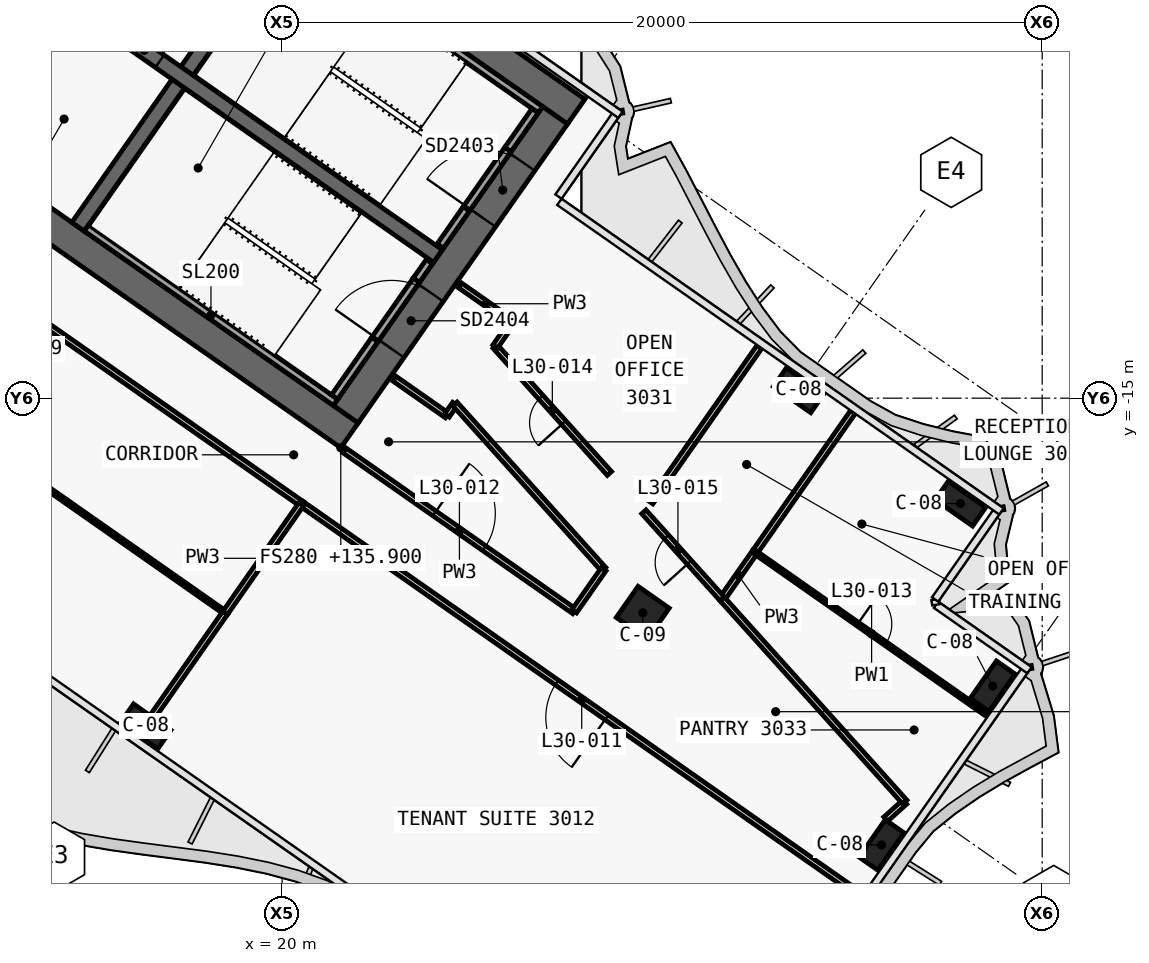
"""IFC4 building model, lengths in metres.
Left out: names, types, materials, properties, quantities, classifications, styles, units other than length and angle.
Written with IfcOpenShell. Run it as: python <this file> out.ifc"""

import sys

from ifc_helpers import new_model, si_unit, direction, frame, frame_2d, origin, origin_2d, place, context, subcontext, project, spatial, polyline, rectangle, outline, extrude, element, fill, save


model = new_model("IFC4")
c1 = context("Model", 3, precision=1e-05, world=origin(), true_north=direction((0.0, 1.0)))
c2 = subcontext(c1, "Body", "Model", "MODEL_VIEW")
j1 = project(units=[si_unit("LENGTHUNIT", "METRE"), si_unit("PLANEANGLEUNIT", "RADIAN")], contexts=[c1])
p1 = place(None, origin())
s1 = spatial("IfcSite", under=j1, at=p1, CompositionType="ELEMENT")
p2 = place(p1, origin())
s2 = spatial("IfcBuilding", under=s1, at=p2, CompositionType="ELEMENT")
p3 = place(p2, frame((0.0, 0.0, 135.9)))
s3 = spatial("IfcBuildingStorey", under=s2, at=p3, CompositionType="ELEMENT", Elevation=135.9)
p4 = place(p3, frame((-0.029, 11.984, 0.0), z_axis=(0.0, 0.0, 1.0), x_axis=(0.819151382952, -0.573577380837, 0.0)))
e1 = element("IfcWall", 1, at=p4, inside=s3, PredefinedType="SHEAR", context=c2, shape_type="SweptSolid", body=[
    extrude(outline(polyline([(33.898, 0.4), (-0.0, 0.4), (0.56, -0.4), (33.898, -0.4), (33.898, 0.4)])), origin(), (0.0, 0.0, 1.0), 3.9),
])
p5 = place(p3, frame((-0.029, -0.712, 0.0), z_axis=(0.0, 0.0, 1.0), x_axis=(0.819151758019, -0.573576845187, 0.0)))
e2 = element("IfcWall", 2, at=p5, inside=s3, PredefinedType="SHEAR", context=c2, shape_type="SweptSolid", body=[
    extrude(outline(polyline([(26.616, 0.4), (-0.0, 0.4), (0.56, -0.4), (26.616, -0.4), (26.616, 0.4)])), origin(), (0.0, 0.0, 1.0), 3.9),
])
p6 = place(p5, frame((1.166, 0.0, 0.0)))
e3 = element("IfcOpeningElement", 3, at=p6, cuts=e2, PredefinedType="OPENING", context=c2, shape_type="SweptSolid", body=[
    extrude(rectangle(XDim=1.5, YDim=2.1, at=frame_2d((0.75, 1.05))), frame((0.0, 0.41, 0.0), z_axis=(0.0, -1.0, 0.0), x_axis=(1.0, 0.0, 0.0)), (0.0, 0.0, 1.0), 0.82),
])
p7 = place(p5, frame((12.366, 0.0, 0.0)))
e4 = element("IfcOpeningElement", 4, at=p7, cuts=e2, PredefinedType="OPENING", context=c2, shape_type="SweptSolid", body=[
    extrude(rectangle(XDim=1.5, YDim=2.1, at=frame_2d((0.75, 1.05))), frame((0.0, 0.41, 0.0), z_axis=(0.0, -1.0, 0.0), x_axis=(1.0, 0.0, 0.0)), (0.0, 0.0, 1.0), 0.82),
])
p8 = place(p3, frame((21.675, -15.421, 0.0), z_axis=(0.0, 0.0, 1.0), x_axis=(0.573581815061, 0.819148278049, 0.0)))
e5 = element("IfcWall", 5, at=p8, inside=s3, PredefinedType="SHEAR", context=c2, shape_type="SweptSolid", body=[
    extrude(outline(polyline([(9.6, 0.4), (0.0, 0.4), (0.0, -0.4), (9.6, -0.4), (9.6, 0.4)])), origin(), (0.0, 0.0, 1.0), 3.9),
])
p9 = place(p8, frame((6.3, 0.0, 0.0)))
e6 = element("IfcOpeningElement", 6, at=p9, cuts=e5, PredefinedType="OPENING", context=c2, shape_type="SweptSolid", body=[
    extrude(rectangle(XDim=1.8, YDim=2.1, at=frame_2d((0.9, 1.05))), frame((0.0, 0.41, 0.0), z_axis=(0.0, -1.0, 0.0), x_axis=(1.0, 0.0, 0.0)), (0.0, 0.0, 1.0), 0.82),
])
p10 = place(p8, frame((2.1, 0.0, 0.0)))
e7 = element("IfcOpeningElement", 7, at=p10, cuts=e5, PredefinedType="OPENING", context=c2, shape_type="SweptSolid", body=[
    extrude(rectangle(XDim=1.8, YDim=2.1, at=frame_2d((0.9, 1.05))), frame((0.0, 0.41, 0.0), z_axis=(0.0, -1.0, 0.0), x_axis=(1.0, 0.0, 0.0)), (0.0, 0.0, 1.0), 0.82),
])
p11 = place(p3, frame((14.63, -10.488, 0.0), z_axis=(0.0, 0.0, 1.0), x_axis=(0.573611936273, 0.819127185829, 0.0)))
e8 = element("IfcWall", 8, at=p11, inside=s3, PredefinedType="SHEAR", context=c2, shape_type="SweptSolid", body=[
    extrude(outline(polyline([(0.0, 0.2), (0.0, -0.2), (4.6, -0.2), (4.6, 0.2), (0.0, 0.2)])), origin(), (0.0, 0.0, 1.0), 3.9),
])
p12 = place(p3, frame((17.498, -6.392, 0.0), z_axis=(0.0, 0.0, 1.0), x_axis=(0.573611936273, 0.819127185829, 0.0)))
e9 = element("IfcWall", 9, at=p12, inside=s3, PredefinedType="SHEAR", context=c2, shape_type="SweptSolid", body=[
    extrude(outline(polyline([(4.6, -0.2), (4.6, 0.2), (0.0, 0.2), (0.0, -0.2), (4.6, -0.2)])), origin(), (0.0, 0.0, 1.0), 3.9),
])
p13 = place(p3, frame((2.638, 3.768, 0.0), z_axis=(0.0, 0.0, 1.0), x_axis=(0.81915267502, -0.573575535572, 0.0)))
e10 = element("IfcWall", 10, at=p13, inside=s3, PredefinedType="SHEAR", context=c2, shape_type="SweptSolid", body=[
    extrude(outline(polyline([(0.0, 0.2), (0.0, -0.2), (26.2, -0.2), (26.2, 0.2), (0.0, 0.2)])), origin(), (0.0, 0.0, 1.0), 3.9),
])
p14 = place(p13, frame((9.637, 0.0, 0.0)))
e11 = element("IfcOpeningElement", 11, at=p14, cuts=e10, PredefinedType="OPENING", context=c2, shape_type="SweptSolid", body=[
    extrude(rectangle(XDim=1.2, YDim=2.1, at=frame_2d((0.6, 1.05))), frame((0.0, 0.21, 0.0), z_axis=(0.0, -1.0, 0.0), x_axis=(1.0, 0.0, 0.0)), (0.0, 0.0, 1.0), 0.42),
])
p15 = place(p13, frame((11.812, 0.0, 0.0)))
e12 = element("IfcOpeningElement", 12, at=p15, cuts=e10, PredefinedType="OPENING", context=c2, shape_type="SweptSolid", body=[
    extrude(rectangle(XDim=1.2, YDim=2.1, at=frame_2d((0.6, 1.05))), frame((0.0, 0.21, 0.0), z_axis=(0.0, -1.0, 0.0), x_axis=(1.0, 0.0, 0.0)), (0.0, 0.0, 1.0), 0.42),
])
p16 = place(p13, frame((13.988, 0.0, 0.0)))
e13 = element("IfcOpeningElement", 13, at=p16, cuts=e10, PredefinedType="OPENING", context=c2, shape_type="SweptSolid", body=[
    extrude(rectangle(XDim=1.2, YDim=2.1, at=frame_2d((0.6, 1.05))), frame((0.0, 0.21, 0.0), z_axis=(0.0, -1.0, 0.0), x_axis=(1.0, 0.0, 0.0)), (0.0, 0.0, 1.0), 0.42),
])
p17 = place(p13, frame((16.262, 0.0, 0.0)))
e14 = element("IfcOpeningElement", 14, at=p17, cuts=e10, PredefinedType="OPENING", context=c2, shape_type="SweptSolid", body=[
    extrude(rectangle(XDim=1.0, YDim=2.1, at=frame_2d((0.5, 1.05))), frame((0.0, 0.21, 0.0), z_axis=(0.0, -1.0, 0.0), x_axis=(1.0, 0.0, 0.0)), (0.0, 0.0, 1.0), 0.42),
])
for number, where, z_axis, x_axis in (
    (15, (16.41, -23.637, 0.0), (0.0, 0.0, 1.0), (0.819, -0.574, 0.0)),
    (16, (33.591, -14.792, 0.0), (0.0, 0.0, 1.0), (0.819, -0.574, 0.0)),
    (17, (37.85, -17.774, 0.0), (0.0, 0.0, 1.0), (0.819, -0.574, 0.0)),
    (18, (35.772, -26.757, 0.0), (0.0, 0.0, 1.0), (0.574, 0.819, 0.0)),
    (19, (38.698, -22.579, 0.0), (0.0, 0.0, 1.0), (0.574, 0.819, 0.0)),
):
    element("IfcColumn", number, at=place(p3, frame(where, z_axis=z_axis, x_axis=x_axis)), inside=s3, PredefinedType="COLUMN", context=c2, shape_type="SweptSolid", body=[
        extrude(rectangle(XDim=1.2, YDim=0.6, at=origin_2d()), origin(), (0.0, 0.0, 1.0), 3.9),
    ])
p18 = place(p3, frame((29.49, -20.649, 0.0), z_axis=(0.0, 0.0, 1.0), x_axis=(0.819152044289, -0.573576436351, 0.0)))
e20 = element("IfcColumn", 20, at=p18, inside=s3, PredefinedType="COLUMN", context=c2, shape_type="SweptSolid", body=[
    extrude(rectangle(XDim=1.0, YDim=1.0, at=origin_2d()), origin(), (0.0, 0.0, 1.0), 3.9),
])
p19 = place(p3, frame((20.243, -2.821, 0.0), z_axis=(0.0, 0.0, 1.0), x_axis=(0.819141584393, -0.57359137434, 0.0)))
e21 = element("IfcWall", 21, at=p19, inside=s3, PredefinedType="SOLIDWALL", context=c2, shape_type="SweptSolid", body=[
    extrude(rectangle(XDim=8.0, YDim=0.2, at=frame_2d((4.0, 0.0))), origin(), (0.0, 0.0, 1.0), 3.62),
])
p20 = place(p3, frame((24.162, -10.998, 0.0), z_axis=(0.0, 0.0, 1.0), x_axis=(0.573612502218, 0.819126789514, 0.0)))
e22 = element("IfcWall", 22, at=p20, inside=s3, PredefinedType="SOLIDWALL", context=c2, shape_type="SweptSolid", body=[
    extrude(rectangle(XDim=1.2, YDim=0.2, at=frame_2d((0.6, 0.0))), origin(), (0.0, 0.0, 1.0), 3.62),
])
p21 = place(p3, frame((25.94, -8.458, 0.0), z_axis=(0.0, 0.0, 1.0), x_axis=(0.573619628835, 0.819121798889, 0.0)))
e23 = element("IfcWall", 23, at=p21, inside=s3, PredefinedType="SOLIDWALL", context=c2, shape_type="SweptSolid", body=[
    extrude(rectangle(XDim=1.25, YDim=0.2, at=frame_2d((0.625, 0.0))), origin(), (0.0, 0.0, 1.0), 3.62),
])
p22 = place(p3, frame((24.85, -10.014, 2.15), z_axis=(0.0, 0.0, 1.0), x_axis=(0.573505465124, 0.819201734296, 0.0)))
e24 = element("IfcWall", 24, at=p22, inside=s3, PredefinedType="SOLIDWALL", context=c2, shape_type="SweptSolid", body=[
    extrude(rectangle(XDim=1.9, YDim=0.2, at=frame_2d((0.95, 0.0))), origin(), (0.0, 0.0, 1.0), 1.47),
])
p23 = place(p3, frame((14.851, -10.521, 0.0), z_axis=(0.0, 0.0, 1.0), x_axis=(0.819141584393, -0.57359137434, 0.0)))
e25 = element("IfcWall", 25, at=p23, inside=s3, PredefinedType="SOLIDWALL", context=c2, shape_type="SweptSolid", body=[
    extrude(rectangle(XDim=8.0, YDim=0.2, at=frame_2d((4.0, 0.0))), origin(), (0.0, 0.0, 1.0), 3.62),
])
p24 = place(p3, frame((21.38, -14.97, 0.0), z_axis=(0.0, 0.0, 1.0), x_axis=(0.573559770908, 0.819163713305, 0.0)))
e26 = element("IfcWall", 26, at=p24, inside=s3, PredefinedType="SOLIDWALL", context=c2, shape_type="SweptSolid", body=[
    extrude(rectangle(XDim=1.85, YDim=0.2, at=frame_2d((0.925, 0.0))), origin(), (0.0, 0.0, 1.0), 3.62),
])
p25 = place(p3, frame((23.531, -11.898, 0.0), z_axis=(0.0, 0.0, 1.0), x_axis=(0.573708088123, 0.819059844958, 0.0)))
e27 = element("IfcWall", 27, at=p25, inside=s3, PredefinedType="SOLIDWALL", context=c2, shape_type="SweptSolid", body=[
    extrude(rectangle(XDim=0.6, YDim=0.2, at=frame_2d((0.3, 0.0))), origin(), (0.0, 0.0, 1.0), 3.62),
])
p26 = place(p3, frame((22.441, -13.455, 2.15), z_axis=(0.0, 0.0, 1.0), x_axis=(0.573591692345, 0.819141361715, 0.0)))
e28 = element("IfcWall", 28, at=p26, inside=s3, PredefinedType="SOLIDWALL", context=c2, shape_type="SweptSolid", body=[
    extrude(rectangle(XDim=1.9, YDim=0.2, at=frame_2d((0.95, 0.0))), origin(), (0.0, 0.0, 1.0), 1.47),
])
p27 = place(p3, frame((21.642, -16.375, 0.0), z_axis=(0.0, 0.0, 1.0), x_axis=(0.819148008851, -0.573582199511, 0.0)))
e29 = element("IfcWall", 29, at=p27, inside=s3, PredefinedType="PARTITIONING", context=c2, shape_type="SweptSolid", body=[
    extrude(rectangle(XDim=7.382, YDim=0.15, at=frame_2d((3.691, 0.0))), origin(), (0.0, 0.0, 1.0), 3.0),
])
p28 = place(p27, frame((2.891, 0.0, 0.0)))
e30 = element("IfcOpeningElement", 30, at=p28, cuts=e29, PredefinedType="OPENING", context=c2, shape_type="SweptSolid", body=[
    extrude(rectangle(XDim=1.6, YDim=2.1, at=frame_2d((0.8, 1.05))), frame((0.0, 0.085, 0.0), z_axis=(0.0, -1.0, 0.0), x_axis=(1.0, 0.0, 0.0)), (0.0, 0.0, 1.0), 0.17),
])
p29 = place(p3, frame((20.513, -17.781, 0.0), z_axis=(0.0, 0.0, 1.0), x_axis=(-0.81916437852, 0.57355882084, 0.0)))
e31 = element("IfcWall", 31, at=p29, inside=s3, PredefinedType="PARTITIONING", context=c2, shape_type="SweptSolid", body=[
    extrude(rectangle(XDim=18.002, YDim=0.15, at=frame_2d((9.001, 0.0))), origin(), (0.0, 0.0, 1.0), 3.0),
])
p30 = place(p29, frame((8.201, 0.0, 0.0)))
e32 = element("IfcOpeningElement", 32, at=p30, cuts=e31, PredefinedType="OPENING", context=c2, shape_type="SweptSolid", body=[
    extrude(rectangle(XDim=1.6, YDim=2.1, at=frame_2d((0.8, 1.05))), frame((0.0, 0.085, 0.0), z_axis=(0.0, -1.0, 0.0), x_axis=(1.0, 0.0, 0.0)), (0.0, 0.0, 1.0), 0.17),
])
p31 = place(p3, frame((35.256, -28.104, 0.0), z_axis=(0.0, 0.0, 1.0), x_axis=(-0.819170750417, 0.573549720305, 0.0)))
e33 = element("IfcWall", 33, at=p31, inside=s3, PredefinedType="PARTITIONING", context=c2, shape_type="SweptSolid", body=[
    extrude(rectangle(XDim=18.002, YDim=0.15, at=frame_2d((9.001, 0.0))), origin(), (0.0, 0.0, 1.0), 2.9),
])
p32 = place(p31, frame((8.201, 0.0, 0.0)))
e34 = element("IfcOpeningElement", 34, at=p32, cuts=e33, PredefinedType="OPENING", context=c2, shape_type="SweptSolid", body=[
    extrude(rectangle(XDim=1.6, YDim=2.1, at=frame_2d((0.8, 1.05))), frame((0.0, 0.085, 0.0), z_axis=(0.0, -1.0, 0.0), x_axis=(1.0, 0.0, 0.0)), (0.0, 0.0, 1.0), 0.17),
])
p33 = place(p3, frame((32.562, -13.645, 0.0), z_axis=(0.0, 0.0, 1.0), x_axis=(-0.573557394979, -0.819165376872, 0.0)))
e35 = element("IfcWall", 35, at=p33, inside=s3, PredefinedType="PARTITIONING", context=c2, shape_type="SweptSolid", body=[
    extrude(rectangle(XDim=4.999, YDim=0.15, at=frame_2d((2.5, 0.0))), origin(), (0.0, 0.0, 1.0), 3.0),
])
p34 = place(p3, frame((28.612, -16.981, 0.0), z_axis=(0.0, 0.0, 1.0), x_axis=(-0.668538381342, 0.743677640293, 0.0)))
e36 = element("IfcWall", 36, at=p34, inside=s3, PredefinedType="PARTITIONING", context=c2, shape_type="SweptSolid", body=[
    extrude(rectangle(XDim=4.494, YDim=0.15, at=frame_2d((2.247, 0.0))), origin(), (0.0, 0.0, 1.0), 3.62),
])
p35 = place(p34, frame((1.797, 0.0, 0.0)))
e37 = element("IfcOpeningElement", 37, at=p35, cuts=e36, PredefinedType="OPENING", context=c2, shape_type="SweptSolid", body=[
    extrude(rectangle(XDim=0.9, YDim=2.1, at=frame_2d((0.45, 1.05))), frame((0.0, 0.085, 0.0), z_axis=(0.0, -1.0, 0.0), x_axis=(1.0, 0.0, 0.0)), (0.0, 0.0, 1.0), 0.17),
])
p36 = place(p3, frame((25.608, -13.639, 0.0), z_axis=(0.0, 0.0, 1.0), x_axis=(0.573441461918, 0.819246537835, 0.0)))
e38 = element("IfcWall", 38, at=p36, inside=s3, PredefinedType="PARTITIONING", context=c2, shape_type="SweptSolid", body=[
    extrude(rectangle(XDim=0.785, YDim=0.15, at=frame_2d((0.392, 0.0))), origin(), (0.0, 0.0, 1.0), 3.62),
])
for number, where, z_axis, x_axis in (
    (39, (26.058, -12.997, 0.0), (0.0, 0.0, 1.0), (-0.819, 0.574, 0.0)),
    (40, (22.961, -14.49, 0.0), (0.0, 0.0, 1.0), (0.819, -0.574, 0.0)),
):
    element("IfcWall", number, at=place(p3, frame(where, z_axis=z_axis, x_axis=x_axis)), inside=s3, PredefinedType="PARTITIONING", context=c2, shape_type="SweptSolid", body=[
        extrude(rectangle(XDim=1.68, YDim=0.15, at=frame_2d((0.84, 0.0))), origin(), (0.0, 0.0, 1.0), 3.62),
    ])
p37 = place(p3, frame((24.337, -15.454, 0.0), z_axis=(0.0, 0.0, 1.0), x_axis=(0.573551446031, 0.819169542132, 0.0)))
e41 = element("IfcWall", 41, at=p37, inside=s3, PredefinedType="PARTITIONING", context=c2, shape_type="SweptSolid", body=[
    extrude(rectangle(XDim=0.368, YDim=0.15, at=frame_2d((0.184, 0.0))), origin(), (0.0, 0.0, 1.0), 3.62),
])
p38 = place(p3, frame((24.548, -15.153, 0.0), z_axis=(0.0, 0.0, 1.0), x_axis=(0.668533527576, -0.743682003619, 0.0)))
e42 = element("IfcWall", 42, at=p38, inside=s3, PredefinedType="PARTITIONING", context=c2, shape_type="SweptSolid", body=[
    extrude(rectangle(XDim=5.851, YDim=0.15, at=frame_2d((2.926, 0.0))), origin(), (0.0, 0.0, 1.0), 3.62),
])
p39 = place(p3, frame((28.46, -19.504, 0.0), z_axis=(0.0, 0.0, 1.0), x_axis=(-0.573547503037, -0.819172302852, 0.0)))
e43 = element("IfcWall", 43, at=p39, inside=s3, PredefinedType="PARTITIONING", context=c2, shape_type="SweptSolid", body=[
    extrude(rectangle(XDim=1.347, YDim=0.15, at=frame_2d((0.673, 0.0))), origin(), (0.0, 0.0, 1.0), 3.0),
])
p40 = place(p3, frame((35.02, -15.365, 0.0), z_axis=(0.0, 0.0, 1.0), x_axis=(-0.573556991349, -0.819165659482, 0.0)))
e44 = element("IfcWall", 44, at=p40, inside=s3, PredefinedType="PARTITIONING", context=c2, shape_type="SweptSolid", body=[
    extrude(rectangle(XDim=4.501, YDim=0.15, at=frame_2d((2.25, 0.0))), origin(), (0.0, 0.0, 1.0), 2.9),
])
p41 = place(p3, frame((32.44, -19.05, 0.0), z_axis=(0.0, 0.0, 1.0), x_axis=(-0.573604109136, -0.8191326669, 0.0)))
e45 = element("IfcWall", 45, at=p41, inside=s3, PredefinedType="PARTITIONING", context=c2, shape_type="SweptSolid", body=[
    extrude(rectangle(XDim=1.502, YDim=0.15, at=frame_2d((0.751, 0.0))), origin(), (0.0, 0.0, 1.0), 3.62),
])
p42 = place(p3, frame((31.578, -20.281, 0.0), z_axis=(0.0, 0.0, 1.0), x_axis=(-0.668570426306, 0.743648831821, 0.0)))
e46 = element("IfcWall", 46, at=p42, inside=s3, PredefinedType="PARTITIONING", context=c2, shape_type="SweptSolid", body=[
    extrude(rectangle(XDim=3.079, YDim=0.15, at=frame_2d((1.54, 0.0))), origin(), (0.0, 0.0, 1.0), 3.0),
])
p43 = place(p42, frame((1.29, 0.0, 0.0)))
e47 = element("IfcOpeningElement", 47, at=p43, cuts=e46, PredefinedType="OPENING", context=c2, shape_type="SweptSolid", body=[
    extrude(rectangle(XDim=0.9, YDim=2.1, at=frame_2d((0.45, 1.05))), frame((0.0, 0.085, 0.0), z_axis=(0.0, -1.0, 0.0), x_axis=(1.0, 0.0, 0.0)), (0.0, 0.0, 1.0), 0.17),
])
p44 = place(p3, frame((32.439, -19.051, 0.0), z_axis=(0.0, 0.0, 1.0), x_axis=(0.819137093595, -0.573597787563, 0.0)))
e48 = element("IfcWall", 48, at=p44, inside=s3, PredefinedType="PARTITIONING", context=c2, shape_type="SweptSolid", body=[
    extrude(rectangle(XDim=7.5, YDim=0.1, at=frame_2d((3.75, 0.0))), origin(), (0.0, 0.0, 1.0), 2.9),
])
p45 = place(p44, frame((3.3, 0.0, 0.0)))
e49 = element("IfcOpeningElement", 49, at=p45, cuts=e48, PredefinedType="OPENING", context=c2, shape_type="SweptSolid", body=[
    extrude(rectangle(XDim=0.9, YDim=2.1, at=frame_2d((0.45, 1.05))), frame((0.0, 0.06, 0.0), z_axis=(0.0, -1.0, 0.0), x_axis=(1.0, 0.0, 0.0)), (0.0, 0.0, 1.0), 0.12),
])
p46 = place(p3, frame((35.883, -26.078, 0.0), z_axis=(0.0, 0.0, 1.0), x_axis=(0.743600238958, 0.668624472049, 0.0)))
e50 = element("IfcWall", 50, at=p46, inside=s3, PredefinedType="PARTITIONING", context=c2, shape_type="SweptSolid", body=[
    extrude(rectangle(XDim=0.674, YDim=0.15, at=frame_2d((0.337, 0.0))), origin(), (0.0, 0.0, 1.0), 2.9),
])
p47 = place(p3, frame((36.384, -25.627, 0.0), z_axis=(0.0, 0.0, 1.0), x_axis=(-0.668510527513, 0.743702678901, 0.0)))
e51 = element("IfcWall", 51, at=p47, inside=s3, PredefinedType="PARTITIONING", context=c2, shape_type="SweptSolid", body=[
    extrude(rectangle(XDim=7.189, YDim=0.15, at=frame_2d((3.594, 0.0))), origin(), (0.0, 0.0, 1.0), 2.9),
])
p48 = place(p3, frame((18.503, -20.648, 0.0), z_axis=(0.0, 0.0, 1.0), x_axis=(-0.819154173185, 0.573573395961, 0.0)))
e52 = element("IfcWall", 52, at=p48, inside=s3, PredefinedType="PARTITIONING", context=c2, shape_type="SweptSolid", body=[
    extrude(rectangle(XDim=18.0, YDim=0.1, at=frame_2d((9.0, 0.0))), origin(), (0.0, 0.0, 1.0), 3.0),
])
p49 = place(p48, frame((8.55, 0.0, 0.0)))
e53 = element("IfcOpeningElement", 53, at=p49, cuts=e52, PredefinedType="OPENING", context=c2, shape_type="SweptSolid", body=[
    extrude(rectangle(XDim=0.9, YDim=2.1, at=frame_2d((0.45, 1.05))), frame((0.0, 0.06, 0.0), z_axis=(0.0, -1.0, 0.0), x_axis=(1.0, 0.0, 0.0)), (0.0, 0.0, 1.0), 0.12),
])
p50 = place(p3, frame((18.503, -20.648, 0.0), z_axis=(0.0, 0.0, 1.0), x_axis=(-0.573560777794, -0.819163008306, 0.0)))
e54 = element("IfcWall", 54, at=p50, inside=s3, PredefinedType="PARTITIONING", context=c2, shape_type="SweptSolid", body=[
    extrude(rectangle(XDim=3.329, YDim=0.15, at=frame_2d((1.665, 0.0))), origin(), (0.0, 0.0, 1.0), 3.0),
])
p51 = place(p3, frame((20.511, -17.78, 0.0), z_axis=(0.0, 0.0, 1.0), x_axis=(-0.573551294295, -0.819169648371, 0.0)))
e55 = element("IfcWall", 55, at=p51, inside=s3, PredefinedType="PARTITIONING", context=c2, shape_type="SweptSolid", body=[
    extrude(rectangle(XDim=3.5, YDim=0.15, at=frame_2d((1.75, 0.0))), origin(), (0.0, 0.0, 1.0), 3.0),
])
p52 = place(p17, origin())
e56 = element("IfcDoor", 56, at=p52, inside=s3, OperationType="SINGLE_SWING_RIGHT", PredefinedType="DOOR", context=c2, shape_type="SweptSolid", body=[
    extrude(rectangle(XDim=1.0, YDim=2.1, at=frame_2d((0.5, 1.05))), frame((0.0, 0.025, 0.0), z_axis=(0.0, -1.0, 0.0), x_axis=(1.0, 0.0, 0.0)), (0.0, 0.0, 1.0), 0.05),
])
fill(e14, e56)
p53 = place(p9, origin())
e57 = element("IfcDoor", 57, at=p53, inside=s3, OperationType="DOUBLE_DOOR_SINGLE_SWING", PredefinedType="DOOR", context=c2, shape_type="SweptSolid", body=[
    extrude(rectangle(XDim=1.8, YDim=2.1, at=frame_2d((0.9, 1.05))), frame((0.0, 0.025, 0.0), z_axis=(0.0, -1.0, 0.0), x_axis=(1.0, 0.0, 0.0)), (0.0, 0.0, 1.0), 0.05),
])
fill(e6, e57)
p54 = place(p10, origin())
e58 = element("IfcDoor", 58, at=p54, inside=s3, OperationType="DOUBLE_DOOR_SINGLE_SWING", PredefinedType="DOOR", context=c2, shape_type="SweptSolid", body=[
    extrude(rectangle(XDim=1.8, YDim=2.1, at=frame_2d((0.9, 1.05))), frame((0.0, 0.025, 0.0), z_axis=(0.0, -1.0, 0.0), x_axis=(1.0, 0.0, 0.0)), (0.0, 0.0, 1.0), 0.05),
])
fill(e7, e58)
p55 = place(p32, origin())
e59 = element("IfcDoor", 59, at=p55, inside=s3, OperationType="DOUBLE_DOOR_SINGLE_SWING", PredefinedType="DOOR", context=c2, shape_type="SweptSolid", body=[
    extrude(rectangle(XDim=1.6, YDim=2.1, at=frame_2d((0.8, 1.05))), frame((0.0, 0.025, 0.0), z_axis=(0.0, -1.0, 0.0), x_axis=(1.0, 0.0, 0.0)), (0.0, 0.0, 1.0), 0.05),
])
fill(e34, e59)
p56 = place(p28, origin())
e60 = element("IfcDoor", 60, at=p56, inside=s3, OperationType="DOUBLE_DOOR_SINGLE_SWING", PredefinedType="DOOR", context=c2, shape_type="SweptSolid", body=[
    extrude(rectangle(XDim=1.6, YDim=2.1, at=frame_2d((0.8, 1.05))), frame((0.0, 0.025, 0.0), z_axis=(0.0, -1.0, 0.0), x_axis=(1.0, 0.0, 0.0)), (0.0, 0.0, 1.0), 0.05),
])
fill(e30, e60)
p57 = place(p45, origin())
e61 = element("IfcDoor", 61, at=p57, inside=s3, OperationType="SINGLE_SWING_LEFT", PredefinedType="DOOR", context=c2, shape_type="SweptSolid", body=[
    extrude(rectangle(XDim=0.9, YDim=2.1, at=frame_2d((0.45, 1.05))), frame((0.0, 0.025, 0.0), z_axis=(0.0, -1.0, 0.0), x_axis=(1.0, 0.0, 0.0)), (0.0, 0.0, 1.0), 0.05),
])
fill(e49, e61)
p58 = place(p35, origin())
e62 = element("IfcDoor", 62, at=p58, inside=s3, OperationType="SINGLE_SWING_RIGHT", PredefinedType="DOOR", context=c2, shape_type="SweptSolid", body=[
    extrude(rectangle(XDim=0.9, YDim=2.1, at=frame_2d((0.45, 1.05))), frame((0.0, 0.025, 0.0), z_axis=(0.0, -1.0, 0.0), x_axis=(1.0, 0.0, 0.0)), (0.0, 0.0, 1.0), 0.05),
])
fill(e37, e62)
p59 = place(p43, origin())
e63 = element("IfcDoor", 63, at=p59, inside=s3, OperationType="SINGLE_SWING_RIGHT", PredefinedType="DOOR", context=c2, shape_type="SweptSolid", body=[
    extrude(rectangle(XDim=0.9, YDim=2.1, at=frame_2d((0.45, 1.05))), frame((0.0, 0.025, 0.0), z_axis=(0.0, -1.0, 0.0), x_axis=(1.0, 0.0, 0.0)), (0.0, 0.0, 1.0), 0.05),
])
fill(e47, e63)
save(model, sys.argv[1])
